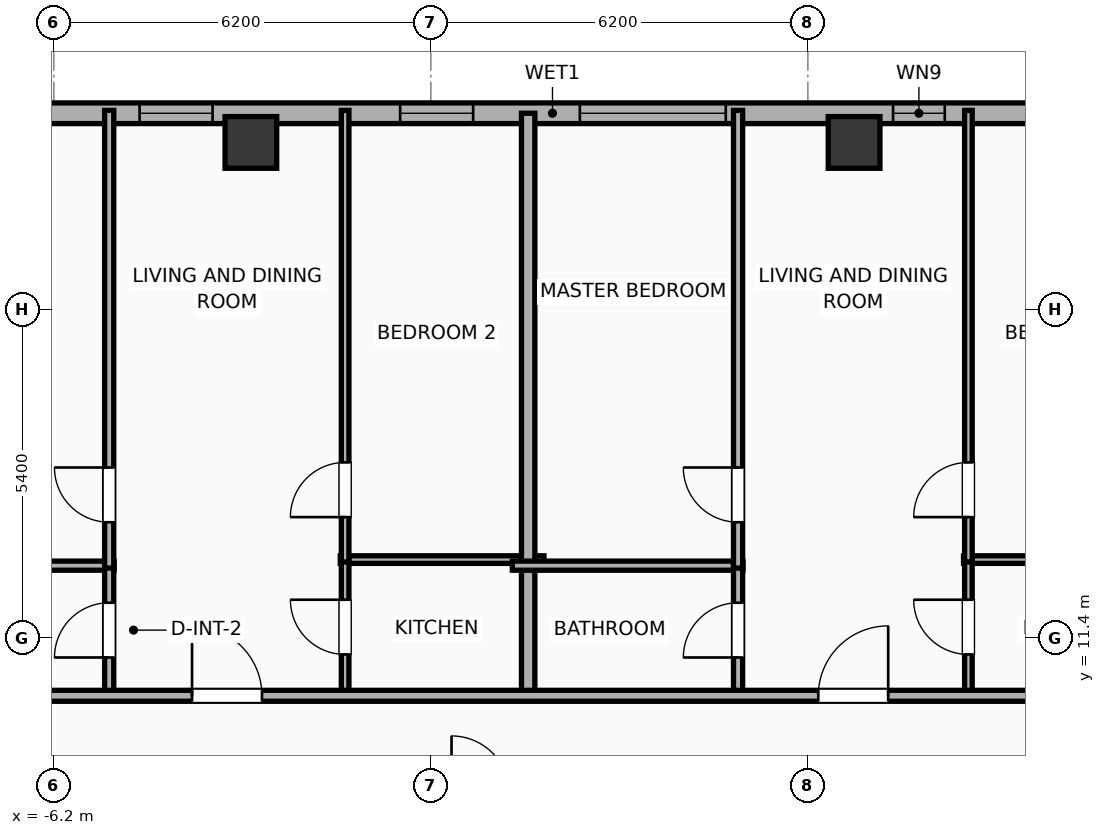
"""IFC4 building model, lengths in metres.
Left out: names, types, materials, properties, quantities, classifications, styles, units other than length and angle.
Written with IfcOpenShell. Run it as: python <this file> out.ifc"""

import sys

from ifc_helpers import new_model, si_unit, direction, frame, frame_2d, origin, origin_2d, place, context, subcontext, project, spatial, rectangle, hollow_rectangle, extrude, element, fill, save


model = new_model("IFC4")
c1 = context("Model", 3, precision=1e-05, world=origin(), true_north=direction((0.0, 1.0)))
c2 = subcontext(c1, "Body", "Model", "MODEL_VIEW")
j1 = project(units=[si_unit("LENGTHUNIT", "METRE"), si_unit("PLANEANGLEUNIT", "RADIAN")], contexts=[c1])
p1 = place(None, origin())
s1 = spatial("IfcSite", under=j1, at=p1, CompositionType="ELEMENT")
p2 = place(p1, origin())
s2 = spatial("IfcBuilding", under=s1, at=p2, CompositionType="ELEMENT")
p3 = place(p2, frame((0.0, 0.0, 227.5)))
s3 = spatial("IfcBuildingStorey", under=s2, at=p3, CompositionType="ELEMENT", Elevation=227.5)
for number, where, z_axis, x_axis in (
    (1, (6.96, 19.55, 0.0), (0.0, 0.0, 1.0), (1.0, 0.0, 0.0)),
    (2, (-2.96, 19.55, 0.0), (0.0, 0.0, 1.0), (1.0, 0.0, 0.0)),
):
    element("IfcColumn", number, at=place(p3, frame(where, z_axis=z_axis, x_axis=x_axis)), inside=s3, PredefinedType="COLUMN", context=c2, shape_type="SweptSolid", body=[
        extrude(hollow_rectangle(XDim=0.85, YDim=0.85, WallThickness=0.028, at=origin_2d()), origin(), (0.0, 0.0, 1.0), 3.9),
    ])
p4 = place(p3, frame((-22.783, 20.03, 0.0), z_axis=(0.0, 0.0, 1.0), x_axis=(1.0, 0.0, 0.0)))
e3 = element("IfcWall", 3, at=p4, inside=s3, PredefinedType="ELEMENTEDWALL", context=c2, shape_type="SweptSolid", body=[
    extrude(rectangle(XDim=49.566, YDim=0.34, at=frame_2d((24.783, 0.0))), origin(), (0.0, 0.0, 1.0), 3.65),
])
p5 = place(p4, frame((25.233, 0.0, 0.75)))
e4 = element("IfcOpeningElement", 4, at=p5, cuts=e3, PredefinedType="OPENING", context=c2, shape_type="SweptSolid", body=[
    extrude(rectangle(XDim=2.4, YDim=2.1, at=frame_2d((1.2, 1.05))), frame((0.0, 0.18, 0.0), z_axis=(0.0, -1.0, 0.0), x_axis=(1.0, 0.0, 0.0)), (0.0, 0.0, 1.0), 0.36),
])
p6 = place(p4, frame((41.756, 0.0, 0.75)))
e5 = element("IfcOpeningElement", 5, at=p6, cuts=e3, PredefinedType="OPENING", context=c2, shape_type="SweptSolid", body=[
    extrude(rectangle(XDim=2.4, YDim=2.1, at=frame_2d((1.2, 1.05))), frame((0.0, 0.18, 0.0), z_axis=(0.0, -1.0, 0.0), x_axis=(1.0, 0.0, 0.0)), (0.0, 0.0, 1.0), 0.36),
])
p7 = place(p4, frame((1.637, 0.0, 0.75)))
e6 = element("IfcOpeningElement", 6, at=p7, cuts=e3, PredefinedType="OPENING", context=c2, shape_type="SweptSolid", body=[
    extrude(rectangle(XDim=1.2, YDim=2.05, at=frame_2d((0.6, 1.025))), frame((0.0, 0.18, 0.0), z_axis=(0.0, -1.0, 0.0), x_axis=(1.0, 0.0, 0.0)), (0.0, 0.0, 1.0), 0.36),
])
p8 = place(p4, frame((8.019, 0.0, 0.75)))
e7 = element("IfcOpeningElement", 7, at=p8, cuts=e3, PredefinedType="OPENING", context=c2, shape_type="SweptSolid", body=[
    extrude(rectangle(XDim=1.2, YDim=2.05, at=frame_2d((0.6, 1.025))), frame((0.0, 0.18, 0.0), z_axis=(0.0, -1.0, 0.0), x_axis=(1.0, 0.0, 0.0)), (0.0, 0.0, 1.0), 0.36),
])
p9 = place(p4, frame((4.524, 0.0, 0.75)))
e8 = element("IfcOpeningElement", 8, at=p9, cuts=e3, PredefinedType="OPENING", context=c2, shape_type="SweptSolid", body=[
    extrude(rectangle(XDim=1.2, YDim=2.05, at=frame_2d((0.6, 1.025))), frame((0.0, 0.18, 0.0), z_axis=(0.0, -1.0, 0.0), x_axis=(1.0, 0.0, 0.0)), (0.0, 0.0, 1.0), 0.36),
])
p10 = place(p4, frame((11.678, 0.0, 0.75)))
e9 = element("IfcOpeningElement", 9, at=p10, cuts=e3, PredefinedType="OPENING", context=c2, shape_type="SweptSolid", body=[
    extrude(rectangle(XDim=1.2, YDim=2.05, at=frame_2d((0.6, 1.025))), frame((0.0, 0.18, 0.0), z_axis=(0.0, -1.0, 0.0), x_axis=(1.0, 0.0, 0.0)), (0.0, 0.0, 1.0), 0.36),
])
p11 = place(p4, frame((17.993, 0.0, 0.75)))
e10 = element("IfcOpeningElement", 10, at=p11, cuts=e3, PredefinedType="OPENING", context=c2, shape_type="SweptSolid", body=[
    extrude(rectangle(XDim=1.2, YDim=2.05, at=frame_2d((0.6, 1.025))), frame((0.0, 0.18, 0.0), z_axis=(0.0, -1.0, 0.0), x_axis=(1.0, 0.0, 0.0)), (0.0, 0.0, 1.0), 0.36),
])
p12 = place(p4, frame((15.138, 0.0, 0.75)))
e11 = element("IfcOpeningElement", 11, at=p12, cuts=e3, PredefinedType="OPENING", context=c2, shape_type="SweptSolid", body=[
    extrude(rectangle(XDim=1.2, YDim=2.05, at=frame_2d((0.6, 1.025))), frame((0.0, 0.18, 0.0), z_axis=(0.0, -1.0, 0.0), x_axis=(1.0, 0.0, 0.0)), (0.0, 0.0, 1.0), 0.36),
])
p13 = place(p4, frame((22.278, 0.0, 0.75)))
e12 = element("IfcOpeningElement", 12, at=p13, cuts=e3, PredefinedType="OPENING", context=c2, shape_type="SweptSolid", body=[
    extrude(rectangle(XDim=1.2, YDim=2.05, at=frame_2d((0.6, 1.025))), frame((0.0, 0.18, 0.0), z_axis=(0.0, -1.0, 0.0), x_axis=(1.0, 0.0, 0.0)), (0.0, 0.0, 1.0), 0.36),
])
p14 = place(p4, frame((30.384, 0.0, 0.75)))
e13 = element("IfcOpeningElement", 13, at=p14, cuts=e3, PredefinedType="OPENING", context=c2, shape_type="SweptSolid", body=[
    extrude(rectangle(XDim=0.85, YDim=2.05, at=frame_2d((0.425, 1.025))), frame((0.0, 0.18, 0.0), z_axis=(0.0, -1.0, 0.0), x_axis=(1.0, 0.0, 0.0)), (0.0, 0.0, 1.0), 0.36),
])
p15 = place(p4, frame((32.603, 0.0, 0.75)))
e14 = element("IfcOpeningElement", 14, at=p15, cuts=e3, PredefinedType="OPENING", context=c2, shape_type="SweptSolid", body=[
    extrude(rectangle(XDim=1.2, YDim=2.05, at=frame_2d((0.6, 1.025))), frame((0.0, 0.18, 0.0), z_axis=(0.0, -1.0, 0.0), x_axis=(1.0, 0.0, 0.0)), (0.0, 0.0, 1.0), 0.36),
])
p16 = place(p4, frame((37.223, 0.0, 0.75)))
e15 = element("IfcOpeningElement", 15, at=p16, cuts=e3, PredefinedType="OPENING", context=c2, shape_type="SweptSolid", body=[
    extrude(rectangle(XDim=1.2, YDim=2.05, at=frame_2d((0.6, 1.025))), frame((0.0, 0.18, 0.0), z_axis=(0.0, -1.0, 0.0), x_axis=(1.0, 0.0, 0.0)), (0.0, 0.0, 1.0), 0.36),
])
p17 = place(p4, frame((45.099, 0.0, 0.75)))
e16 = element("IfcOpeningElement", 16, at=p17, cuts=e3, PredefinedType="OPENING", context=c2, shape_type="SweptSolid", body=[
    extrude(rectangle(XDim=1.2, YDim=2.05, at=frame_2d((0.6, 1.025))), frame((0.0, 0.18, 0.0), z_axis=(0.0, -1.0, 0.0), x_axis=(1.0, 0.0, 0.0)), (0.0, 0.0, 1.0), 0.36),
])
p18 = place(p4, frame((47.209, 0.0, 0.75)))
e17 = element("IfcOpeningElement", 17, at=p18, cuts=e3, PredefinedType="OPENING", context=c2, shape_type="SweptSolid", body=[
    extrude(rectangle(XDim=1.2, YDim=2.05, at=frame_2d((0.6, 1.025))), frame((0.0, 0.18, 0.0), z_axis=(0.0, -1.0, 0.0), x_axis=(1.0, 0.0, 0.0)), (0.0, 0.0, 1.0), 0.36),
])
p19 = place(p3, frame((-9.06, 12.59, 0.0), z_axis=(0.0, 0.0, 1.0), x_axis=(1.0, 0.0, 0.0)))
e18 = element("IfcWall", 18, at=p19, inside=s3, PredefinedType="PLUMBINGWALL", context=c2, shape_type="SweptSolid", body=[
    extrude(rectangle(XDim=3.85, YDim=0.15, at=frame_2d((1.925, 0.0))), origin(), (0.0, 0.0, 1.0), 3.65),
])
p20 = place(p3, frame((-1.49, 12.69, 0.0), z_axis=(0.0, 0.0, 1.0), x_axis=(1.0, 0.0, 0.0)))
e19 = element("IfcWall", 19, at=p20, inside=s3, PredefinedType="PARTITIONING", context=c2, shape_type="SweptSolid", body=[
    extrude(rectangle(XDim=3.35, YDim=0.125, at=frame_2d((1.675, 0.0))), origin(), (0.0, 0.0, 1.0), 3.65),
])
p21 = place(p3, frame((-5.29, 10.43, 0.0), z_axis=(0.0, 0.0, 1.0), x_axis=(0.0, 1.0, 0.0)))
e20 = element("IfcWall", 20, at=p21, inside=s3, PredefinedType="PLUMBINGWALL", context=c2, shape_type="SweptSolid", body=[
    extrude(rectangle(XDim=2.2, YDim=0.15, at=frame_2d((1.1, 0.0))), origin(), (0.0, 0.0, 1.0), 3.65),
])
p22 = place(p21, frame((0.65, 0.0, 0.0)))
e21 = element("IfcOpeningElement", 21, at=p22, cuts=e20, PredefinedType="OPENING", context=c2, shape_type="SweptSolid", body=[
    extrude(rectangle(XDim=0.9, YDim=2.05, at=frame_2d((0.45, 1.025))), frame((0.0, 0.085, 0.0), z_axis=(0.0, -1.0, 0.0), x_axis=(1.0, 0.0, 0.0)), (0.0, 0.0, 1.0), 0.17),
])
p23 = place(p3, frame((-5.29, 12.55, 0.0), z_axis=(0.0, 0.0, 1.0), x_axis=(0.0, 1.0, 0.0)))
e22 = element("IfcWall", 22, at=p23, inside=s3, PredefinedType="PLUMBINGWALL", context=c2, shape_type="SweptSolid", body=[
    extrude(rectangle(XDim=7.527, YDim=0.15, at=frame_2d((3.763, 0.0))), origin(), (0.0, 0.0, 1.0), 3.65),
])
p24 = place(p23, frame((0.754, 0.0, 0.0)))
e23 = element("IfcOpeningElement", 23, at=p24, cuts=e22, PredefinedType="OPENING", context=c2, shape_type="SweptSolid", body=[
    extrude(rectangle(XDim=0.9, YDim=2.05, at=frame_2d((0.45, 1.025))), frame((0.0, 0.085, 0.0), z_axis=(0.0, -1.0, 0.0), x_axis=(1.0, 0.0, 0.0)), (0.0, 0.0, 1.0), 0.17),
])
p25 = place(p3, frame((-1.41, 10.43, 0.0), z_axis=(0.0, 0.0, 1.0), x_axis=(0.0, 1.0, 0.0)))
e24 = element("IfcWall", 24, at=p25, inside=s3, PredefinedType="PARTITIONING", context=c2, shape_type="SweptSolid", body=[
    extrude(rectangle(XDim=2.3, YDim=0.125, at=frame_2d((1.15, 0.0))), origin(), (0.0, 0.0, 1.0), 3.65),
])
p26 = place(p25, frame((0.7, 0.0, 0.0)))
e25 = element("IfcOpeningElement", 25, at=p26, cuts=e24, PredefinedType="OPENING", context=c2, shape_type="SweptSolid", body=[
    extrude(rectangle(XDim=0.9, YDim=2.05, at=frame_2d((0.45, 1.025))), frame((0.0, 0.073, 0.0), z_axis=(0.0, -1.0, 0.0), x_axis=(1.0, 0.0, 0.0)), (0.0, 0.0, 1.0), 0.145),
])
p27 = place(p3, frame((-1.41, 12.65, 0.0), z_axis=(0.0, 0.0, 1.0), x_axis=(0.0, 1.0, 0.0)))
e26 = element("IfcWall", 26, at=p27, inside=s3, PredefinedType="PARTITIONING", context=c2, shape_type="SweptSolid", body=[
    extrude(rectangle(XDim=7.427, YDim=0.125, at=frame_2d((3.713, 0.0))), origin(), (0.0, 0.0, 1.0), 3.65),
])
p28 = place(p27, frame((0.738, 0.0, 0.0)))
e27 = element("IfcOpeningElement", 27, at=p28, cuts=e26, PredefinedType="OPENING", context=c2, shape_type="SweptSolid", body=[
    extrude(rectangle(XDim=0.9, YDim=2.05, at=frame_2d((0.45, 1.025))), frame((0.0, 0.073, 0.0), z_axis=(0.0, -1.0, 0.0), x_axis=(1.0, 0.0, 0.0)), (0.0, 0.0, 1.0), 0.145),
])
p29 = place(p3, frame((1.6, 10.37, 0.0), z_axis=(0.0, 0.0, 1.0), x_axis=(0.0, 1.0, 0.0)))
e28 = element("IfcWall", 28, at=p29, inside=s3, PredefinedType="PARTITIONING", context=c2, shape_type="SweptSolid", body=[
    extrude(rectangle(XDim=9.66, YDim=0.22, at=frame_2d((4.83, 0.0))), origin(), (0.0, 0.0, 1.0), 3.65),
])
p30 = place(p3, frame((1.34, 12.59, 0.0), z_axis=(0.0, 0.0, 1.0), x_axis=(1.0, 0.0, 0.0)))
e29 = element("IfcWall", 29, at=p30, inside=s3, PredefinedType="PLUMBINGWALL", context=c2, shape_type="SweptSolid", body=[
    extrude(rectangle(XDim=3.792, YDim=0.15, at=frame_2d((1.896, 0.0))), origin(), (0.0, 0.0, 1.0), 3.65),
])
p31 = place(p3, frame((8.76, 12.69, 0.0), z_axis=(0.0, 0.0, 1.0), x_axis=(1.0, 0.0, 0.0)))
e30 = element("IfcWall", 30, at=p31, inside=s3, PredefinedType="PARTITIONING", context=c2, shape_type="SweptSolid", body=[
    extrude(rectangle(XDim=3.5, YDim=0.125, at=frame_2d((1.75, 0.0))), origin(), (0.0, 0.0, 1.0), 3.65),
])
p32 = place(p3, frame((5.052, 10.43, 0.0), z_axis=(0.0, 0.0, 1.0), x_axis=(0.0, 1.0, 0.0)))
e31 = element("IfcWall", 31, at=p32, inside=s3, PredefinedType="PLUMBINGWALL", context=c2, shape_type="SweptSolid", body=[
    extrude(rectangle(XDim=2.2, YDim=0.15, at=frame_2d((1.1, 0.0))), origin(), (0.0, 0.0, 1.0), 3.09),
])
p33 = place(p32, frame((0.65, 0.0, 0.0)))
e32 = element("IfcOpeningElement", 32, at=p33, cuts=e31, PredefinedType="OPENING", context=c2, shape_type="SweptSolid", body=[
    extrude(rectangle(XDim=0.9, YDim=2.05, at=frame_2d((0.45, 1.025))), frame((0.0, 0.085, 0.0), z_axis=(0.0, -1.0, 0.0), x_axis=(1.0, 0.0, 0.0)), (0.0, 0.0, 1.0), 0.17),
])
p34 = place(p3, frame((5.052, 12.55, 0.0), z_axis=(0.0, 0.0, 1.0), x_axis=(0.0, 1.0, 0.0)))
e33 = element("IfcWall", 33, at=p34, inside=s3, PredefinedType="PLUMBINGWALL", context=c2, shape_type="SweptSolid", body=[
    extrude(rectangle(XDim=7.527, YDim=0.15, at=frame_2d((3.763, 0.0))), origin(), (0.0, 0.0, 1.0), 3.65),
])
p35 = place(p34, frame((0.754, 0.0, 0.0)))
e34 = element("IfcOpeningElement", 34, at=p35, cuts=e33, PredefinedType="OPENING", context=c2, shape_type="SweptSolid", body=[
    extrude(rectangle(XDim=0.9, YDim=2.05, at=frame_2d((0.45, 1.025))), frame((0.0, 0.085, 0.0), z_axis=(0.0, -1.0, 0.0), x_axis=(1.0, 0.0, 0.0)), (0.0, 0.0, 1.0), 0.17),
])
p36 = place(p3, frame((8.84, 10.43, 0.0), z_axis=(0.0, 0.0, 1.0), x_axis=(0.0, 1.0, 0.0)))
e35 = element("IfcWall", 35, at=p36, inside=s3, PredefinedType="PARTITIONING", context=c2, shape_type="SweptSolid", body=[
    extrude(rectangle(XDim=2.3, YDim=0.125, at=frame_2d((1.15, 0.0))), origin(), (0.0, 0.0, 1.0), 3.65),
])
p37 = place(p36, frame((0.7, 0.0, 0.0)))
e36 = element("IfcOpeningElement", 36, at=p37, cuts=e35, PredefinedType="OPENING", context=c2, shape_type="SweptSolid", body=[
    extrude(rectangle(XDim=0.9, YDim=2.05, at=frame_2d((0.45, 1.025))), frame((0.0, 0.073, 0.0), z_axis=(0.0, -1.0, 0.0), x_axis=(1.0, 0.0, 0.0)), (0.0, 0.0, 1.0), 0.145),
])
p38 = place(p3, frame((8.84, 12.65, 0.0), z_axis=(0.0, 0.0, 1.0), x_axis=(0.0, 1.0, 0.0)))
e37 = element("IfcWall", 37, at=p38, inside=s3, PredefinedType="PARTITIONING", context=c2, shape_type="SweptSolid", body=[
    extrude(rectangle(XDim=7.427, YDim=0.125, at=frame_2d((3.713, 0.0))), origin(), (0.0, 0.0, 1.0), 3.65),
])
p39 = place(p38, frame((0.738, 0.0, 0.0)))
e38 = element("IfcOpeningElement", 38, at=p39, cuts=e37, PredefinedType="OPENING", context=c2, shape_type="SweptSolid", body=[
    extrude(rectangle(XDim=0.9, YDim=2.05, at=frame_2d((0.45, 1.025))), frame((0.0, 0.073, 0.0), z_axis=(0.0, -1.0, 0.0), x_axis=(1.0, 0.0, 0.0)), (0.0, 0.0, 1.0), 0.145),
])
p40 = place(p3, frame((-26.23, 10.45, 0.0), z_axis=(0.0, 0.0, 1.0), x_axis=(1.0, 0.0, 0.0)))
e39 = element("IfcWall", 39, at=p40, inside=s3, PredefinedType="PARTITIONING", context=c2, shape_type="SweptSolid", body=[
    extrude(rectangle(XDim=56.46, YDim=0.18, at=frame_2d((28.23, 0.0))), origin(), (0.0, 0.0, 1.0), 3.65),
])
p41 = place(p40, frame((3.072, 0.0, 0.0)))
e40 = element("IfcOpeningElement", 40, at=p41, cuts=e39, PredefinedType="OPENING", context=c2, shape_type="SweptSolid", body=[
    extrude(rectangle(XDim=1.15, YDim=2.05, at=frame_2d((0.575, 1.025))), frame((0.0, 0.1, 0.0), z_axis=(0.0, -1.0, 0.0), x_axis=(1.0, 0.0, 0.0)), (0.0, 0.0, 1.0), 0.2),
])
p42 = place(p40, frame((12.146, 0.0, 0.0)))
e41 = element("IfcOpeningElement", 41, at=p42, cuts=e39, PredefinedType="OPENING", context=c2, shape_type="SweptSolid", body=[
    extrude(rectangle(XDim=1.15, YDim=2.05, at=frame_2d((0.575, 1.025))), frame((0.0, 0.1, 0.0), z_axis=(0.0, -1.0, 0.0), x_axis=(1.0, 0.0, 0.0)), (0.0, 0.0, 1.0), 0.2),
])
p43 = place(p40, frame((22.302, 0.0, 0.0)))
e42 = element("IfcOpeningElement", 42, at=p43, cuts=e39, PredefinedType="OPENING", context=c2, shape_type="SweptSolid", body=[
    extrude(rectangle(XDim=1.15, YDim=2.05, at=frame_2d((0.575, 1.025))), frame((0.0, 0.1, 0.0), z_axis=(0.0, -1.0, 0.0), x_axis=(1.0, 0.0, 0.0)), (0.0, 0.0, 1.0), 0.2),
])
p44 = place(p40, frame((32.601, 0.0, 0.0)))
e43 = element("IfcOpeningElement", 43, at=p44, cuts=e39, PredefinedType="OPENING", context=c2, shape_type="SweptSolid", body=[
    extrude(rectangle(XDim=1.15, YDim=2.05, at=frame_2d((0.575, 1.025))), frame((0.0, 0.1, 0.0), z_axis=(0.0, -1.0, 0.0), x_axis=(1.0, 0.0, 0.0)), (0.0, 0.0, 1.0), 0.2),
])
p45 = place(p40, frame((40.941, 0.0, 0.0)))
e44 = element("IfcOpeningElement", 44, at=p45, cuts=e39, PredefinedType="OPENING", context=c2, shape_type="SweptSolid", body=[
    extrude(rectangle(XDim=0.9, YDim=2.05, at=frame_2d((0.45, 1.025))), frame((0.0, 0.1, 0.0), z_axis=(0.0, -1.0, 0.0), x_axis=(1.0, 0.0, 0.0)), (0.0, 0.0, 1.0), 0.2),
])
p46 = place(p40, frame((45.559, 0.0, 0.0)))
e45 = element("IfcOpeningElement", 45, at=p46, cuts=e39, PredefinedType="OPENING", context=c2, shape_type="SweptSolid", body=[
    extrude(rectangle(XDim=1.15, YDim=2.05, at=frame_2d((0.575, 1.025))), frame((0.0, 0.1, 0.0), z_axis=(0.0, -1.0, 0.0), x_axis=(1.0, 0.0, 0.0)), (0.0, 0.0, 1.0), 0.2),
])
p47 = place(p40, frame((53.125, 0.0, 0.0)))
e46 = element("IfcOpeningElement", 46, at=p47, cuts=e39, PredefinedType="OPENING", context=c2, shape_type="SweptSolid", body=[
    extrude(rectangle(XDim=0.9, YDim=2.05, at=frame_2d((0.45, 1.025))), frame((0.0, 0.1, 0.0), z_axis=(0.0, -1.0, 0.0), x_axis=(1.0, 0.0, 0.0)), (0.0, 0.0, 1.0), 0.2),
])
p48 = place(p5, origin())
e47 = element("IfcWindow", 47, at=p48, inside=s3, PartitioningType="SINGLE_PANEL", PredefinedType="WINDOW", context=c2, shape_type="SweptSolid", body=[
    extrude(rectangle(XDim=2.4, YDim=2.1, at=frame_2d((1.2, 1.05))), frame((0.0, 0.03, 0.0), z_axis=(0.0, -1.0, 0.0), x_axis=(1.0, 0.0, 0.0)), (0.0, 0.0, 1.0), 0.06),
])
fill(e4, e47)
p49 = place(p11, origin())
e48 = element("IfcWindow", 48, at=p49, inside=s3, PartitioningType="SINGLE_PANEL", PredefinedType="WINDOW", context=c2, shape_type="SweptSolid", body=[
    extrude(rectangle(XDim=1.2, YDim=2.05, at=frame_2d((0.6, 1.025))), frame((0.0, 0.03, 0.0), z_axis=(0.0, -1.0, 0.0), x_axis=(1.0, 0.0, 0.0)), (0.0, 0.0, 1.0), 0.06),
])
fill(e10, e48)
p50 = place(p13, origin())
e49 = element("IfcWindow", 49, at=p50, inside=s3, PartitioningType="SINGLE_PANEL", PredefinedType="WINDOW", context=c2, shape_type="SweptSolid", body=[
    extrude(rectangle(XDim=1.2, YDim=2.05, at=frame_2d((0.6, 1.025))), frame((0.0, 0.03, 0.0), z_axis=(0.0, -1.0, 0.0), x_axis=(1.0, 0.0, 0.0)), (0.0, 0.0, 1.0), 0.06),
])
fill(e12, e49)
p51 = place(p14, origin())
e50 = element("IfcWindow", 50, at=p51, inside=s3, PartitioningType="SINGLE_PANEL", PredefinedType="WINDOW", context=c2, shape_type="SweptSolid", body=[
    extrude(rectangle(XDim=0.85, YDim=2.05, at=frame_2d((0.425, 1.025))), frame((0.0, 0.03, 0.0), z_axis=(0.0, -1.0, 0.0), x_axis=(1.0, 0.0, 0.0)), (0.0, 0.0, 1.0), 0.06),
])
fill(e13, e50)
p52 = place(p22, origin())
e51 = element("IfcDoor", 51, at=p52, inside=s3, OperationType="SINGLE_SWING_LEFT", PredefinedType="DOOR", context=c2, shape_type="SweptSolid", body=[
    extrude(rectangle(XDim=0.9, YDim=2.05, at=frame_2d((0.45, 1.025))), frame((0.0, 0.025, 0.0), z_axis=(0.0, -1.0, 0.0), x_axis=(1.0, 0.0, 0.0)), (0.0, 0.0, 1.0), 0.05),
])
fill(e21, e51)
p53 = place(p24, origin())
e52 = element("IfcDoor", 52, at=p53, inside=s3, OperationType="SINGLE_SWING_RIGHT", PredefinedType="DOOR", context=c2, shape_type="SweptSolid", body=[
    extrude(rectangle(XDim=0.9, YDim=2.05, at=frame_2d((0.45, 1.025))), frame((0.0, 0.025, 0.0), z_axis=(0.0, -1.0, 0.0), x_axis=(1.0, 0.0, 0.0)), (0.0, 0.0, 1.0), 0.05),
])
fill(e23, e52)
p54 = place(p26, origin())
e53 = element("IfcDoor", 53, at=p54, inside=s3, OperationType="SINGLE_SWING_RIGHT", PredefinedType="DOOR", context=c2, shape_type="SweptSolid", body=[
    extrude(rectangle(XDim=0.9, YDim=2.05, at=frame_2d((0.45, 1.025))), frame((0.0, 0.025, 0.0), z_axis=(0.0, -1.0, 0.0), x_axis=(1.0, 0.0, 0.0)), (0.0, 0.0, 1.0), 0.05),
])
fill(e25, e53)
p55 = place(p28, origin())
e54 = element("IfcDoor", 54, at=p55, inside=s3, OperationType="SINGLE_SWING_LEFT", PredefinedType="DOOR", context=c2, shape_type="SweptSolid", body=[
    extrude(rectangle(XDim=0.9, YDim=2.05, at=frame_2d((0.45, 1.025))), frame((0.0, 0.025, 0.0), z_axis=(0.0, -1.0, 0.0), x_axis=(1.0, 0.0, 0.0)), (0.0, 0.0, 1.0), 0.05),
])
fill(e27, e54)
p56 = place(p33, origin())
e55 = element("IfcDoor", 55, at=p56, inside=s3, OperationType="SINGLE_SWING_LEFT", PredefinedType="DOOR", context=c2, shape_type="SweptSolid", body=[
    extrude(rectangle(XDim=0.9, YDim=2.05, at=frame_2d((0.45, 1.025))), frame((0.0, 0.025, 0.0), z_axis=(0.0, -1.0, 0.0), x_axis=(1.0, 0.0, 0.0)), (0.0, 0.0, 1.0), 0.05),
])
fill(e32, e55)
p57 = place(p35, origin())
e56 = element("IfcDoor", 56, at=p57, inside=s3, OperationType="SINGLE_SWING_RIGHT", PredefinedType="DOOR", context=c2, shape_type="SweptSolid", body=[
    extrude(rectangle(XDim=0.9, YDim=2.05, at=frame_2d((0.45, 1.025))), frame((0.0, 0.025, 0.0), z_axis=(0.0, -1.0, 0.0), x_axis=(1.0, 0.0, 0.0)), (0.0, 0.0, 1.0), 0.05),
])
fill(e34, e56)
p58 = place(p37, origin())
e57 = element("IfcDoor", 57, at=p58, inside=s3, OperationType="SINGLE_SWING_RIGHT", PredefinedType="DOOR", context=c2, shape_type="SweptSolid", body=[
    extrude(rectangle(XDim=0.9, YDim=2.05, at=frame_2d((0.45, 1.025))), frame((0.0, 0.025, 0.0), z_axis=(0.0, -1.0, 0.0), x_axis=(1.0, 0.0, 0.0)), (0.0, 0.0, 1.0), 0.05),
])
fill(e36, e57)
p59 = place(p39, origin())
e58 = element("IfcDoor", 58, at=p59, inside=s3, OperationType="SINGLE_SWING_LEFT", PredefinedType="DOOR", context=c2, shape_type="SweptSolid", body=[
    extrude(rectangle(XDim=0.9, YDim=2.05, at=frame_2d((0.45, 1.025))), frame((0.0, 0.025, 0.0), z_axis=(0.0, -1.0, 0.0), x_axis=(1.0, 0.0, 0.0)), (0.0, 0.0, 1.0), 0.05),
])
fill(e38, e58)
p60 = place(p43, origin())
e59 = element("IfcDoor", 59, at=p60, inside=s3, OperationType="SINGLE_SWING_LEFT", PredefinedType="DOOR", context=c2, shape_type="SweptSolid", body=[
    extrude(rectangle(XDim=1.15, YDim=2.05, at=frame_2d((0.575, 1.025))), frame((0.0, 0.025, 0.0), z_axis=(0.0, -1.0, 0.0), x_axis=(1.0, 0.0, 0.0)), (0.0, 0.0, 1.0), 0.05),
])
fill(e42, e59)
p61 = place(p44, origin())
e60 = element("IfcDoor", 60, at=p61, inside=s3, OperationType="SINGLE_SWING_RIGHT", PredefinedType="DOOR", context=c2, shape_type="SweptSolid", body=[
    extrude(rectangle(XDim=1.15, YDim=2.05, at=frame_2d((0.575, 1.025))), frame((0.0, 0.025, 0.0), z_axis=(0.0, -1.0, 0.0), x_axis=(1.0, 0.0, 0.0)), (0.0, 0.0, 1.0), 0.05),
])
fill(e43, e60)
save(model, sys.argv[1])
